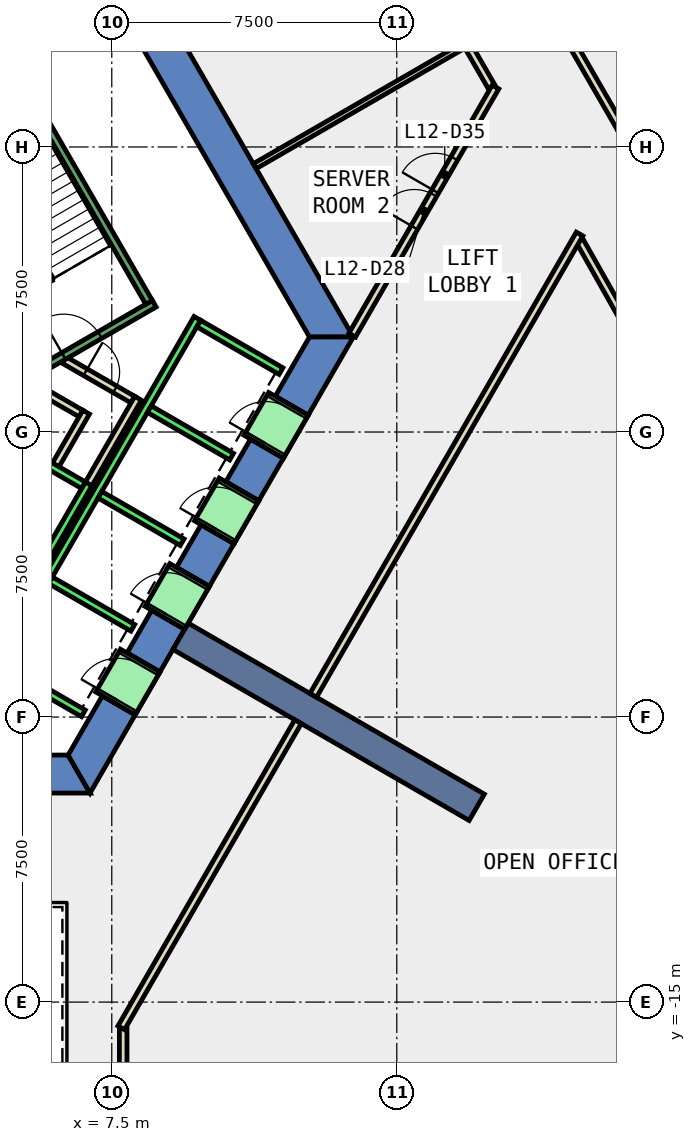
"""IFC4 building model, lengths in metres.
Left out: names, types, materials, properties, quantities, classifications, styles, units other than length and angle.
Written with IfcOpenShell. Run it as: python <this file> out.ifc"""

import sys

from ifc_helpers import new_model, si_unit, direction, frame, frame_2d, origin, place, context, subcontext, project, spatial, polyline, rectangle, outline, extrude, element, fill, save


model = new_model("IFC4")
c1 = context("Model", 3, precision=1e-05, world=origin(), true_north=direction((0.0, 1.0)))
c2 = subcontext(c1, "Body", "Model", "MODEL_VIEW")
j1 = project(units=[si_unit("LENGTHUNIT", "METRE"), si_unit("PLANEANGLEUNIT", "RADIAN")], contexts=[c1])
p1 = place(None, origin())
s1 = spatial("IfcSite", under=j1, at=p1, CompositionType="ELEMENT")
p2 = place(p1, origin())
s2 = spatial("IfcBuilding", under=s1, at=p2, CompositionType="ELEMENT")
p3 = place(p2, frame((0.0, 0.0, 60.2)))
s3 = spatial("IfcBuildingStorey", under=s2, at=p3, CompositionType="ELEMENT", Elevation=60.2)
p4 = place(p3, frame((0.0, 0.0, -0.4)))
e1 = element("IfcWall", 1, at=p4, inside=s3, PredefinedType="SHEAR", context=c2, shape_type="SweptSolid", body=[
    extrude(outline(polyline([(8.517, 11.748), (7.651, 11.248), (12.702, 2.5), (13.856, 2.5), (8.517, 11.748)])), origin(), (0.0, 0.0, 1.0), 4.2),
])
p5 = place(p3, frame((0.0, 0.0, -0.4)))
e2 = element("IfcWall", 2, at=p5, inside=s3, PredefinedType="SHEAR", context=c2, shape_type="SweptSolid", body=[
    extrude(outline(polyline([(5.75, -8.5), (5.75, -9.5), (6.928, -9.5), (6.351, -8.5), (5.75, -8.5)])), origin(), (0.0, 0.0, 1.0), 4.2),
])
p6 = place(p3, frame((0.0, 0.0, -0.4)))
e3 = element("IfcWall", 3, at=p6, inside=s3, PredefinedType="SHEAR", context=c2, shape_type="SweptSolid", body=[
    extrude(outline(polyline([(8.117, -7.44), (7.252, -6.94), (6.351, -8.5), (6.928, -9.5), (8.117, -7.44)])), origin(), (0.0, 0.0, 1.0), 4.2),
])
p7 = place(p3, frame((0.0, 0.0, -0.4)))
e4 = element("IfcWall", 4, at=p7, inside=s3, PredefinedType="SHEAR", context=c2, shape_type="SweptSolid", body=[
    extrude(outline(polyline([(9.417, -5.189), (8.551, -4.689), (7.902, -5.814), (8.767, -6.314), (9.417, -5.189)])), origin(), (0.0, 0.0, 1.0), 4.2),
])
p8 = place(p3, frame((0.0, 0.0, -0.4)))
e5 = element("IfcWall", 5, at=p8, inside=s3, PredefinedType="SHEAR", context=c2, shape_type="SweptSolid", body=[
    extrude(outline(polyline([(10.717, -2.937), (9.851, -2.437), (9.201, -3.563), (10.067, -4.063), (10.717, -2.937)])), origin(), (0.0, 0.0, 1.0), 4.2),
])
p9 = place(p3, frame((0.0, 0.0, -0.4)))
e6 = element("IfcWall", 6, at=p9, inside=s3, PredefinedType="SHEAR", context=c2, shape_type="SweptSolid", body=[
    extrude(outline(polyline([(12.017, -0.686), (11.151, -0.186), (10.501, -1.311), (11.367, -1.811), (12.017, -0.686)])), origin(), (0.0, 0.0, 1.0), 4.2),
])
p10 = place(p3, frame((0.0, 0.0, -0.4)))
e7 = element("IfcWall", 7, at=p10, inside=s3, PredefinedType="SHEAR", context=c2, shape_type="SweptSolid", body=[
    extrude(outline(polyline([(11.801, 0.94), (12.667, 0.44), (13.856, 2.5), (12.702, 2.5), (11.801, 0.94)])), origin(), (0.0, 0.0, 1.0), 4.2),
])
p11 = place(p3, frame((0.0, 0.0, 3.6)))
e8 = element("IfcWall", 8, at=p11, inside=s3, PredefinedType="SHEAR", context=c2, shape_type="SweptSolid", body=[
    extrude(outline(polyline([(8.767, -6.314), (7.902, -5.814), (7.252, -6.94), (8.117, -7.44), (8.767, -6.314)])), origin(), (0.0, 0.0, 1.0), 0.2),
])
p12 = place(p3, frame((0.0, 0.0, 3.6)))
e9 = element("IfcWall", 9, at=p12, inside=s3, PredefinedType="SHEAR", context=c2, shape_type="SweptSolid", body=[
    extrude(outline(polyline([(10.067, -4.063), (9.201, -3.563), (8.551, -4.689), (9.417, -5.189), (10.067, -4.063)])), origin(), (0.0, 0.0, 1.0), 0.2),
])
p13 = place(p3, frame((0.0, 0.0, 3.6)))
e10 = element("IfcWall", 10, at=p13, inside=s3, PredefinedType="SHEAR", context=c2, shape_type="SweptSolid", body=[
    extrude(outline(polyline([(11.367, -1.811), (10.501, -1.311), (9.851, -2.437), (10.717, -2.937), (11.367, -1.811)])), origin(), (0.0, 0.0, 1.0), 0.2),
])
p14 = place(p3, frame((0.0, 0.0, 3.6)))
e11 = element("IfcWall", 11, at=p14, inside=s3, PredefinedType="SHEAR", context=c2, shape_type="SweptSolid", body=[
    extrude(outline(polyline([(12.667, 0.44), (11.801, 0.94), (11.151, -0.186), (12.017, -0.686), (12.667, 0.44)])), origin(), (0.0, 0.0, 1.0), 0.2),
])
p15 = place(p3, frame((9.31, -5.375, -0.4), z_axis=(0.0, 0.0, 1.0), x_axis=(0.866017533419, -0.500013631625, 0.0)))
e12 = element("IfcWall", 12, at=p15, inside=s3, PredefinedType="SHEAR", context=c2, shape_type="SweptSolid", body=[
    extrude(rectangle(XDim=9.0, YDim=0.8, at=frame_2d((4.5, 0.0))), origin(), (0.0, 0.0, 1.0), 4.2),
])
p16 = place(p3, frame((17.497, 9.078, 0.0), z_axis=(0.0, 0.0, 1.0), x_axis=(-0.500126451326, 0.865952384768, 0.0)))
e13 = element("IfcWall", 13, at=p16, inside=s3, PredefinedType="PARTITIONING", context=c2, shape_type="SweptSolid", body=[
    extrude(rectangle(XDim=1.238, YDim=0.2, at=frame_2d((0.619, 0.0))), origin(), (0.0, 0.0, 1.0), 3.8),
])
p17 = place(p3, frame((22.42, 0.415, 0.0), z_axis=(0.0, 0.0, 1.0), x_axis=(-0.491823859571, 0.870694717543, 0.0)))
e14 = element("IfcWall", 14, at=p17, inside=s3, PredefinedType="PARTITIONING", context=c2, shape_type="SweptSolid", body=[
    extrude(rectangle(XDim=5.309, YDim=0.2, at=frame_2d((2.654, 0.0))), origin(), (0.0, 0.0, 1.0), 3.8),
])
p18 = place(p3, frame((17.318, 14.187, 0.0), z_axis=(0.0, 0.0, 1.0), x_axis=(0.499986381413, -0.866033266336, 0.0)))
e15 = element("IfcWall", 15, at=p18, inside=s3, PredefinedType="PARTITIONING", context=c2, shape_type="SweptSolid", body=[
    extrude(rectangle(XDim=7.18, YDim=0.2, at=frame_2d((3.59, 0.0))), origin(), (0.0, 0.0, 1.0), 3.8),
])
p19 = place(p18, frame((3.165, 0.0, 0.0)))
e16 = element("IfcOpeningElement", 16, at=p19, cuts=e15, PredefinedType="OPENING", context=c2, shape_type="SweptSolid", body=[
    extrude(rectangle(XDim=1.0, YDim=2.1, at=frame_2d((0.5, 1.05))), frame((0.0, 0.11, 0.0), z_axis=(0.0, -1.0, 0.0), x_axis=(1.0, 0.0, 0.0)), (0.0, 0.0, 1.0), 0.22),
])
p20 = place(p3, frame((5.499, 1.172, 0.0), z_axis=(0.0, 0.0, 1.0), x_axis=(0.866333505267, -0.499465972466, 0.0)))
e17 = element("IfcWall", 17, at=p20, inside=s3, PredefinedType="PARTITIONING", context=c2, shape_type="SweptSolid", body=[
    extrude(rectangle(XDim=1.374, YDim=0.2, at=frame_2d((0.687, 0.0))), origin(), (0.0, 0.0, 1.0), 3.8),
])
p21 = place(p3, frame((6.826, 0.522, 0.0), z_axis=(0.0, 0.0, 1.0), x_axis=(-0.500016722714, -0.866015748706, 0.0)))
e18 = element("IfcWall", 18, at=p21, inside=s3, PredefinedType="PARTITIONING", context=c2, shape_type="SweptSolid", body=[
    extrude(rectangle(XDim=1.7, YDim=0.2, at=frame_2d((0.85, 0.0))), origin(), (0.0, 0.0, 1.0), 3.8),
])
p22 = place(p3, frame((6.25, 1.894, 0.0), z_axis=(0.0, 0.0, 1.0), x_axis=(0.866043184279, -0.499969202016, 0.0)))
e19 = element("IfcWall", 19, at=p22, inside=s3, PredefinedType="PARTITIONING", context=c2, shape_type="SweptSolid", body=[
    extrude(rectangle(XDim=2.084, YDim=0.2, at=frame_2d((1.042, 0.0))), origin(), (0.0, 0.0, 1.0), 3.8),
])
p23 = place(p22, frame((0.642, 0.0, 0.0)))
e20 = element("IfcOpeningElement", 20, at=p23, cuts=e19, PredefinedType="OPENING", context=c2, shape_type="SweptSolid", body=[
    extrude(rectangle(XDim=0.9, YDim=2.1, at=frame_2d((0.45, 1.05))), frame((0.0, 0.11, 0.0), z_axis=(0.0, -1.0, 0.0), x_axis=(1.0, 0.0, 0.0)), (0.0, 0.0, 1.0), 0.22),
])
p24 = place(p3, frame((8.192, 0.888, 0.0), z_axis=(0.0, 0.0, 1.0), x_axis=(-0.499940625693, -0.866059680843, 0.0)))
e21 = element("IfcWall", 21, at=p24, inside=s3, PredefinedType="PARTITIONING", context=c2, shape_type="SweptSolid", body=[
    extrude(rectangle(XDim=2.68, YDim=0.2, at=frame_2d((1.34, 0.0))), origin(), (0.0, 0.0, 1.0), 3.8),
])
p25 = place(p3, frame((11.261, 6.994, 0.0), z_axis=(0.0, 0.0, 1.0), x_axis=(0.866043905515, 0.499967952693, 0.0)))
e22 = element("IfcWall", 22, at=p25, inside=s3, PredefinedType="PARTITIONING", context=c2, shape_type="SweptSolid", body=[
    extrude(rectangle(XDim=6.542, YDim=0.15, at=frame_2d((3.271, 0.0))), origin(), (0.0, 0.0, 1.0), 3.8),
])
p26 = place(p3, frame((13.827, 2.55, 0.0), z_axis=(0.0, 0.0, 1.0), x_axis=(0.500116794417, 0.865957961995, 0.0)))
e23 = element("IfcWall", 23, at=p26, inside=s3, PredefinedType="PARTITIONING", context=c2, shape_type="SweptSolid", body=[
    extrude(rectangle(XDim=7.538, YDim=0.2, at=frame_2d((3.769, 0.0))), origin(), (0.0, 0.0, 1.0), 3.8),
])
p27 = place(p26, frame((3.269, 0.0, 0.0)))
e24 = element("IfcOpeningElement", 24, at=p27, cuts=e23, PredefinedType="OPENING", context=c2, shape_type="SweptSolid", body=[
    extrude(rectangle(XDim=1.0, YDim=2.1, at=frame_2d((0.5, 1.05))), frame((0.0, 0.11, 0.0), z_axis=(0.0, -1.0, 0.0), x_axis=(1.0, 0.0, 0.0)), (0.0, 0.0, 1.0), 0.22),
])
p28 = place(p26, frame((4.369, 0.0, 0.0)))
e25 = element("IfcOpeningElement", 25, at=p28, cuts=e23, PredefinedType="OPENING", context=c2, shape_type="SweptSolid", body=[
    extrude(rectangle(XDim=1.0, YDim=2.1, at=frame_2d((0.5, 1.05))), frame((0.0, 0.11, 0.0), z_axis=(0.0, -1.0, 0.0), x_axis=(1.0, 0.0, 0.0)), (0.0, 0.0, 1.0), 0.22),
])
p29 = place(p3, frame((7.8, -15.69, 0.0), z_axis=(0.0, 0.0, 1.0), x_axis=(0.0, -1.0, 0.0)))
e26 = element("IfcWall", 26, at=p29, inside=s3, PredefinedType="PARTITIONING", context=c2, shape_type="SweptSolid", body=[
    extrude(rectangle(XDim=3.87, YDim=0.2, at=frame_2d((1.935, 0.0))), origin(), (0.0, 0.0, 1.0), 3.8),
])
p30 = place(p3, frame((19.81, 5.211, 0.0), z_axis=(0.0, 0.0, 1.0), x_axis=(-0.500003368273, -0.866023459102, 0.0)))
e27 = element("IfcWall", 27, at=p30, inside=s3, PredefinedType="PARTITIONING", context=c2, shape_type="SweptSolid", body=[
    extrude(rectangle(XDim=14.018, YDim=0.2, at=frame_2d((7.009, 0.0))), origin(), (0.0, 0.0, 1.0), 3.8),
])
p31 = place(p3, frame((12.401, -7.622, 0.0), z_axis=(0.0, 0.0, 1.0), x_axis=(-0.500029185841, -0.866008552675, 0.0)))
e28 = element("IfcWall", 28, at=p31, inside=s3, PredefinedType="PARTITIONING", context=c2, shape_type="SweptSolid", body=[
    extrude(rectangle(XDim=9.301, YDim=0.2, at=frame_2d((4.651, 0.0))), origin(), (0.0, 0.0, 1.0), 3.8),
])
p32 = place(p3, frame((5.492, -3.788, 0.0), z_axis=(0.0, 0.0, 1.0), x_axis=(0.500011755427, 0.866018616679, 0.0)))
e29 = element("IfcWall", 29, at=p32, inside=s3, PredefinedType="STANDARD", context=c2, shape_type="SweptSolid", body=[
    extrude(rectangle(XDim=2.8, YDim=0.2, at=frame_2d((1.4, 0.0))), origin(), (0.0, 0.0, 1.0), 3.8),
])
p33 = place(p3, frame((4.677, -0.2, 0.0), z_axis=(0.0, 0.0, 1.0), x_axis=(0.865973769406, -0.500089422704, 0.0)))
e30 = element("IfcWall", 30, at=p33, inside=s3, PredefinedType="STANDARD", context=c2, shape_type="SweptSolid", body=[
    extrude(rectangle(XDim=2.399, YDim=0.2, at=frame_2d((1.2, 0.0))), origin(), (0.0, 0.0, 1.0), 3.8),
])
p34 = place(p3, frame((4.451, -6.19, 0.0), z_axis=(0.0, 0.0, 1.0), x_axis=(0.50000090737, 0.866024879913, 0.0)))
e31 = element("IfcWall", 31, at=p34, inside=s3, PredefinedType="STANDARD", context=c2, shape_type="SweptSolid", body=[
    extrude(rectangle(XDim=10.6, YDim=0.2, at=frame_2d((5.3, 0.0))), origin(), (0.0, 0.0, 1.0), 3.8),
])
for number, where, z_axis, x_axis in (
    (32, (4.588, -6.153, 0.0), (0.0, 0.0, 1.0), (0.866, -0.5, 0.0)),
    (33, (5.888, -3.902, 0.0), (0.0, 0.0, 1.0), (0.866, -0.5, 0.0)),
    (34, (7.188, -1.65, 0.0), (0.0, 0.0, 1.0), (0.866, -0.5, 0.0)),
    (35, (8.488, 0.602, 0.0), (0.0, 0.0, 1.0), (0.866, -0.5, 0.0)),
):
    element("IfcWall", number, at=place(p3, frame(where, z_axis=z_axis, x_axis=x_axis)), inside=s3, PredefinedType="STANDARD", context=c2, shape_type="SweptSolid", body=[
        extrude(rectangle(XDim=2.5, YDim=0.2, at=frame_2d((1.25, 0.0))), origin(), (0.0, 0.0, 1.0), 3.8),
    ])
p35 = place(p3, frame((9.788, 2.853, 0.0), z_axis=(0.0, 0.0, 1.0), x_axis=(0.865998541277, -0.500046524342, 0.0)))
e36 = element("IfcWall", 36, at=p35, inside=s3, PredefinedType="STANDARD", context=c2, shape_type="SweptSolid", body=[
    extrude(rectangle(XDim=2.5, YDim=0.2, at=frame_2d((1.25, 0.0))), origin(), (0.0, 0.0, 1.0), 3.8),
])
p36 = place(p3, frame((7.598, -7.14, 0.0), z_axis=(0.0, 0.0, 1.0), x_axis=(0.500362116554, 0.865816234728, 0.0)))
e37 = element("IfcWall", 37, at=p36, inside=s3, PredefinedType="STANDARD", context=c2, shape_type="SweptSolid", body=[
    extrude(rectangle(XDim=1.299, YDim=1.2, at=frame_2d((0.65, 0.0))), origin(), (0.0, 0.0, 1.0), 2.4),
])
p37 = place(p36, frame((0.1, 0.0, 0.0)))
e38 = element("IfcOpeningElement", 38, at=p37, cuts=e37, PredefinedType="OPENING", context=c2, shape_type="SweptSolid", body=[
    extrude(rectangle(XDim=1.1, YDim=2.3, at=frame_2d((0.55, 1.15))), frame((0.0, 0.61, 0.0), z_axis=(0.0, -1.0, 0.0), x_axis=(1.0, 0.0, 0.0)), (0.0, 0.0, 1.0), 1.22),
])
p38 = place(p3, frame((8.898, -4.889, 0.0), z_axis=(0.0, 0.0, 1.0), x_axis=(0.500036693733, 0.866004217611, 0.0)))
e39 = element("IfcWall", 39, at=p38, inside=s3, PredefinedType="STANDARD", context=c2, shape_type="SweptSolid", body=[
    extrude(rectangle(XDim=1.3, YDim=1.2, at=frame_2d((0.65, 0.0))), origin(), (0.0, 0.0, 1.0), 2.4),
])
p39 = place(p38, frame((0.1, 0.0, 0.0)))
e40 = element("IfcOpeningElement", 40, at=p39, cuts=e39, PredefinedType="OPENING", context=c2, shape_type="SweptSolid", body=[
    extrude(rectangle(XDim=1.1, YDim=2.3, at=frame_2d((0.55, 1.15))), frame((0.0, 0.61, 0.0), z_axis=(0.0, -1.0, 0.0), x_axis=(1.0, 0.0, 0.0)), (0.0, 0.0, 1.0), 1.22),
])
p40 = place(p3, frame((10.198, -2.637, 0.0), z_axis=(0.0, 0.0, 1.0), x_axis=(0.49989585183, 0.866085525409, 0.0)))
e41 = element("IfcWall", 41, at=p40, inside=s3, PredefinedType="STANDARD", context=c2, shape_type="SweptSolid", body=[
    extrude(rectangle(XDim=1.3, YDim=1.2, at=frame_2d((0.65, 0.0))), origin(), (0.0, 0.0, 1.0), 2.4),
])
p41 = place(p40, frame((0.1, 0.0, 0.0)))
e42 = element("IfcOpeningElement", 42, at=p41, cuts=e41, PredefinedType="OPENING", context=c2, shape_type="SweptSolid", body=[
    extrude(rectangle(XDim=1.1, YDim=2.3, at=frame_2d((0.55, 1.15))), frame((0.0, 0.61, 0.0), z_axis=(0.0, -1.0, 0.0), x_axis=(1.0, 0.0, 0.0)), (0.0, 0.0, 1.0), 1.22),
])
p42 = place(p3, frame((11.498, -0.385, 0.0), z_axis=(0.0, 0.0, 1.0), x_axis=(0.500221244143, 0.865897630733, 0.0)))
e43 = element("IfcWall", 43, at=p42, inside=s3, PredefinedType="STANDARD", context=c2, shape_type="SweptSolid", body=[
    extrude(rectangle(XDim=1.299, YDim=1.2, at=frame_2d((0.65, 0.0))), origin(), (0.0, 0.0, 1.0), 2.4),
])
p43 = place(p42, frame((0.1, 0.0, 0.0)))
e44 = element("IfcOpeningElement", 44, at=p43, cuts=e43, PredefinedType="OPENING", context=c2, shape_type="SweptSolid", body=[
    extrude(rectangle(XDim=1.1, YDim=2.3, at=frame_2d((0.55, 1.15))), frame((0.0, 0.61, 0.0), z_axis=(0.0, -1.0, 0.0), x_axis=(1.0, 0.0, 0.0)), (0.0, 0.0, 1.0), 1.22),
])
p44 = place(p3, frame((4.806, 1.176, 0.0), z_axis=(0.0, 0.0, 1.0), x_axis=(0.866059941101, 0.499940174841, 0.0)))
e45 = element("IfcWall", 45, at=p44, inside=s3, PredefinedType="STANDARD", context=c2, shape_type="SweptSolid", body=[
    extrude(rectangle(XDim=4.4, YDim=0.2, at=frame_2d((2.2, 0.0))), origin(), (0.0, 0.0, 1.0), 3.8),
])
p45 = place(p44, frame((1.65, 0.0, 0.0)))
e46 = element("IfcOpeningElement", 46, at=p45, cuts=e45, PredefinedType="OPENING", context=c2, shape_type="SweptSolid", body=[
    extrude(rectangle(XDim=1.1, YDim=2.2, at=frame_2d((0.55, 1.1))), frame((0.0, 0.11, 0.0), z_axis=(0.0, -1.0, 0.0), x_axis=(1.0, 0.0, 0.0)), (0.0, 0.0, 1.0), 0.22),
])
p46 = place(p3, frame((8.48, 3.412, 0.0), z_axis=(0.0, 0.0, 1.0), x_axis=(-0.499978703459, 0.866037698999, 0.0)))
e47 = element("IfcWall", 47, at=p46, inside=s3, PredefinedType="STANDARD", context=c2, shape_type="SweptSolid", body=[
    extrude(rectangle(XDim=6.9, YDim=0.2, at=frame_2d((3.45, 0.0))), origin(), (0.0, 0.0, 1.0), 3.8),
])
p47 = place(p27, origin())
e48 = element("IfcDoor", 48, at=p47, inside=s3, OperationType="SINGLE_SWING_LEFT", PredefinedType="DOOR", context=c2, shape_type="SweptSolid", body=[
    extrude(rectangle(XDim=1.0, YDim=2.1, at=frame_2d((0.5, 1.05))), frame((0.0, 0.025, 0.0), z_axis=(0.0, -1.0, 0.0), x_axis=(1.0, 0.0, 0.0)), (0.0, 0.0, 1.0), 0.05),
])
fill(e24, e48)
p48 = place(p23, origin())
e49 = element("IfcDoor", 49, at=p48, inside=s3, OperationType="SINGLE_SWING_LEFT", PredefinedType="DOOR", context=c2, shape_type="SweptSolid", body=[
    extrude(rectangle(XDim=0.9, YDim=2.1, at=frame_2d((0.45, 1.05))), frame((0.0, 0.025, 0.0), z_axis=(0.0, -1.0, 0.0), x_axis=(1.0, 0.0, 0.0)), (0.0, 0.0, 1.0), 0.05),
])
fill(e20, e49)
p49 = place(p28, origin())
e50 = element("IfcDoor", 50, at=p49, inside=s3, OperationType="SINGLE_SWING_RIGHT", PredefinedType="DOOR", context=c2, shape_type="SweptSolid", body=[
    extrude(rectangle(XDim=1.0, YDim=2.1, at=frame_2d((0.5, 1.05))), frame((0.0, 0.025, 0.0), z_axis=(0.0, -1.0, 0.0), x_axis=(1.0, 0.0, 0.0)), (0.0, 0.0, 1.0), 0.05),
])
fill(e25, e50)
p50 = place(p37, origin())
e51 = element("IfcDoor", 51, at=p50, inside=s3, OperationType="SLIDING_TO_LEFT", PredefinedType="DOOR", context=c2, shape_type="SweptSolid", body=[
    extrude(rectangle(XDim=1.1, YDim=2.3, at=frame_2d((0.55, 1.15))), frame((0.0, 0.025, 0.0), z_axis=(0.0, -1.0, 0.0), x_axis=(1.0, 0.0, 0.0)), (0.0, 0.0, 1.0), 0.05),
])
fill(e38, e51)
p51 = place(p39, origin())
e52 = element("IfcDoor", 52, at=p51, inside=s3, OperationType="SLIDING_TO_LEFT", PredefinedType="DOOR", context=c2, shape_type="SweptSolid", body=[
    extrude(rectangle(XDim=1.1, YDim=2.3, at=frame_2d((0.55, 1.15))), frame((0.0, 0.025, 0.0), z_axis=(0.0, -1.0, 0.0), x_axis=(1.0, 0.0, 0.0)), (0.0, 0.0, 1.0), 0.05),
])
fill(e40, e52)
p52 = place(p41, origin())
e53 = element("IfcDoor", 53, at=p52, inside=s3, OperationType="SLIDING_TO_LEFT", PredefinedType="DOOR", context=c2, shape_type="SweptSolid", body=[
    extrude(rectangle(XDim=1.1, YDim=2.3, at=frame_2d((0.55, 1.15))), frame((0.0, 0.025, 0.0), z_axis=(0.0, -1.0, 0.0), x_axis=(1.0, 0.0, 0.0)), (0.0, 0.0, 1.0), 0.05),
])
fill(e42, e53)
p53 = place(p43, origin())
e54 = element("IfcDoor", 54, at=p53, inside=s3, OperationType="SLIDING_TO_LEFT", PredefinedType="DOOR", context=c2, shape_type="SweptSolid", body=[
    extrude(rectangle(XDim=1.1, YDim=2.3, at=frame_2d((0.55, 1.15))), frame((0.0, 0.025, 0.0), z_axis=(0.0, -1.0, 0.0), x_axis=(1.0, 0.0, 0.0)), (0.0, 0.0, 1.0), 0.05),
])
fill(e44, e54)
p54 = place(p45, origin())
e55 = element("IfcDoor", 55, at=p54, inside=s3, OperationType="SINGLE_SWING_LEFT", PredefinedType="DOOR", context=c2, shape_type="SweptSolid", body=[
    extrude(rectangle(XDim=1.1, YDim=2.2, at=frame_2d((0.55, 1.1))), frame((0.0, 0.025, 0.0), z_axis=(0.0, -1.0, 0.0), x_axis=(1.0, 0.0, 0.0)), (0.0, 0.0, 1.0), 0.05),
])
fill(e46, e55)
save(model, sys.argv[1])
